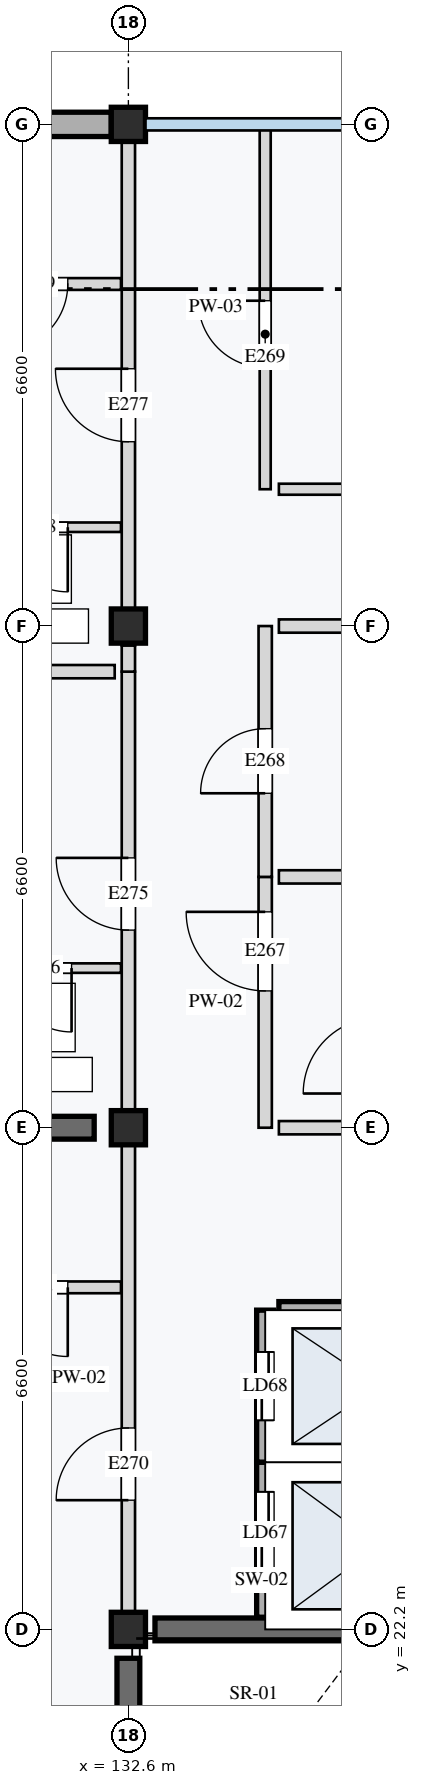
"""IFC4 building model, lengths in metres.
Left out: names, types, materials, properties, quantities, classifications, styles, units other than length and angle.
Written with IfcOpenShell. Run it as: python <this file> out.ifc"""

import sys

from ifc_helpers import new_model, si_unit, direction, frame, frame_2d, origin, origin_2d, place, context, subcontext, project, spatial, rectangle, extrude, element, fill, save


model = new_model("IFC4")
c1 = context("Model", 3, precision=1e-05, world=origin(), true_north=direction((0.0, 1.0)))
c2 = subcontext(c1, "Body", "Model", "MODEL_VIEW")
j1 = project(units=[si_unit("LENGTHUNIT", "METRE"), si_unit("PLANEANGLEUNIT", "RADIAN")], contexts=[c1])
p1 = place(None, origin())
s1 = spatial("IfcSite", under=j1, at=p1, CompositionType="ELEMENT")
p2 = place(p1, origin())
s2 = spatial("IfcBuilding", under=s1, at=p2, CompositionType="ELEMENT")
p3 = place(p2, frame((0.0, 0.0, 21.2)))
s3 = spatial("IfcBuildingStorey", under=s2, at=p3, CompositionType="ELEMENT", Elevation=21.2)
for number, where, z_axis, x_axis in (
    (1, (132.6, 22.2, 0.0), (0.0, 0.0, 1.0), (1.0, 0.0, 0.0)),
    (2, (132.6, 28.8, 0.0), (0.0, 0.0, 1.0), (1.0, 0.0, 0.0)),
    (3, (132.6, 35.4, 0.0), (0.0, 0.0, 1.0), (1.0, 0.0, 0.0)),
    (4, (132.6, 42.0, 0.0), (0.0, 0.0, 1.0), (1.0, 0.0, 0.0)),
):
    element("IfcColumn", number, at=place(p3, frame(where, z_axis=z_axis, x_axis=x_axis)), inside=s3, PredefinedType="COLUMN", context=c2, shape_type="SweptSolid", body=[
        extrude(rectangle(XDim=0.45, YDim=0.45, at=origin_2d()), origin(), (0.0, 0.0, 1.0), 3.2),
    ])
p4 = place(p3, frame((132.6, 15.98, 0.0), z_axis=(0.0, 0.0, 1.0), x_axis=(0.0, 1.0, 0.0)))
e5 = element("IfcWall", 5, at=p4, inside=s3, PredefinedType="SHEAR", context=c2, shape_type="SweptSolid", body=[
    extrude(rectangle(XDim=5.84, YDim=0.3, at=frame_2d((2.92, 0.0))), origin(), (0.0, 0.0, 1.0), 2.96),
])
p5 = place(p3, frame((132.95, 22.2, 0.0), z_axis=(0.0, 0.0, 1.0), x_axis=(1.0, 0.0, 0.0)))
e6 = element("IfcWall", 6, at=p5, inside=s3, PredefinedType="SHEAR", context=c2, shape_type="SweptSolid", body=[
    extrude(rectangle(XDim=2.8, YDim=0.3, at=frame_2d((1.4, 0.0))), origin(), (0.0, 0.0, 1.0), 2.96),
])
p6 = place(p3, frame((126.45, 28.8, 0.0), z_axis=(0.0, 0.0, 1.0), x_axis=(1.0, 0.0, 0.0)))
e7 = element("IfcWall", 7, at=p6, inside=s3, PredefinedType="SHEAR", context=c2, shape_type="SweptSolid", body=[
    extrude(rectangle(XDim=5.7, YDim=0.3, at=frame_2d((2.85, 0.0))), origin(), (0.0, 0.0, 1.0), 2.96),
])
p7 = place(p3, frame((126.225, 42.0, 0.0), z_axis=(0.0, 0.0, 1.0), x_axis=(1.0, 0.0, 0.0)))
e8 = element("IfcWall", 8, at=p7, inside=s3, PredefinedType="STANDARD", context=c2, shape_type="SweptSolid", body=[
    extrude(rectangle(XDim=6.15, YDim=0.32, at=frame_2d((3.075, 0.0))), origin(), (0.0, 0.0, 1.0), 2.65),
])
p8 = place(p3, frame((134.4, 22.36, 0.0), z_axis=(0.0, 0.0, 1.0), x_axis=(0.0, 1.0, 0.0)))
e9 = element("IfcWall", 9, at=p8, inside=s3, PredefinedType="STANDARD", context=c2, shape_type="SweptSolid", body=[
    extrude(rectangle(XDim=2.04, YDim=0.225, at=frame_2d((1.02, 0.0))), origin(), (0.0, 0.0, 1.0), 2.96),
])
p9 = place(p8, frame((0.55, 0.0, 0.0)))
e10 = element("IfcOpeningElement", 10, at=p9, cuts=e9, PredefinedType="OPENING", context=c2, shape_type="SweptSolid", body=[
    extrude(rectangle(XDim=1.1, YDim=2.1, at=frame_2d((0.55, 1.05))), frame((0.0, 0.123, 0.0), z_axis=(0.0, -1.0, 0.0), x_axis=(1.0, 0.0, 0.0)), (0.0, 0.0, 1.0), 0.245),
])
p10 = place(p3, frame((134.4, 24.4, 0.0), z_axis=(0.0, 0.0, 1.0), x_axis=(0.0, 1.0, 0.0)))
e11 = element("IfcWall", 11, at=p10, inside=s3, PredefinedType="STANDARD", context=c2, shape_type="SweptSolid", body=[
    extrude(rectangle(XDim=2.0, YDim=0.225, at=frame_2d((1.0, 0.0))), origin(), (0.0, 0.0, 1.0), 2.96),
])
p11 = place(p10, frame((0.55, 0.0, 0.0)))
e12 = element("IfcOpeningElement", 12, at=p11, cuts=e11, PredefinedType="OPENING", context=c2, shape_type="SweptSolid", body=[
    extrude(rectangle(XDim=0.9, YDim=2.1, at=frame_2d((0.45, 1.05))), frame((0.0, 0.123, 0.0), z_axis=(0.0, -1.0, 0.0), x_axis=(1.0, 0.0, 0.0)), (0.0, 0.0, 1.0), 0.245),
])
for number, where, z_axis, x_axis in (
    (13, (134.58, 24.4, 0.0), (0.0, 0.0, 1.0), (1.0, 0.0, 0.0)),
    (14, (134.58, 26.4, 0.0), (0.0, 0.0, 1.0), (1.0, 0.0, 0.0)),
):
    element("IfcWall", number, at=place(p3, frame(where, z_axis=z_axis, x_axis=x_axis)), inside=s3, PredefinedType="STANDARD", context=c2, shape_type="SweptSolid", body=[
        extrude(rectangle(XDim=2.64, YDim=0.225, at=frame_2d((1.32, 0.0))), origin(), (0.0, 0.0, 1.0), 2.96),
    ])
p12 = place(p3, frame((134.4, 28.8, 0.0), z_axis=(0.0, 0.0, 1.0), x_axis=(0.0, 1.0, 0.0)))
e15 = element("IfcWall", 15, at=p12, inside=s3, PredefinedType="PARTITIONING", context=c2, shape_type="SweptSolid", body=[
    extrude(rectangle(XDim=3.3, YDim=0.175, at=frame_2d((1.65, 0.0))), origin(), (0.0, 0.0, 1.0), 2.96),
])
p13 = place(p12, frame((1.8, 0.0, 0.0)))
e16 = element("IfcOpeningElement", 16, at=p13, cuts=e15, PredefinedType="OPENING", context=c2, shape_type="SweptSolid", body=[
    extrude(rectangle(XDim=1.04, YDim=2.12, at=frame_2d((0.52, 1.06))), frame((0.0, 0.097, 0.0), z_axis=(0.0, -1.0, 0.0), x_axis=(1.0, 0.0, 0.0)), (0.0, 0.0, 1.0), 0.195),
])
p14 = place(p3, frame((134.4, 32.1, 0.0), z_axis=(0.0, 0.0, 1.0), x_axis=(0.0, 1.0, 0.0)))
e17 = element("IfcWall", 17, at=p14, inside=s3, PredefinedType="PARTITIONING", context=c2, shape_type="SweptSolid", body=[
    extrude(rectangle(XDim=3.3, YDim=0.175, at=frame_2d((1.65, 0.0))), origin(), (0.0, 0.0, 1.0), 2.96),
])
p15 = place(p14, frame((1.1, 0.0, 0.0)))
e18 = element("IfcOpeningElement", 18, at=p15, cuts=e17, PredefinedType="OPENING", context=c2, shape_type="SweptSolid", body=[
    extrude(rectangle(XDim=0.85, YDim=2.0, at=frame_2d((0.425, 1.0))), frame((0.0, 0.097, 0.0), z_axis=(0.0, -1.0, 0.0), x_axis=(1.0, 0.0, 0.0)), (0.0, 0.0, 1.0), 0.195),
])
for number, where, z_axis, x_axis in (
    (19, (134.58, 28.8, 0.0), (0.0, 0.0, 1.0), (1.0, 0.0, 0.0)),
    (20, (134.58, 32.1, 0.0), (0.0, 0.0, 1.0), (1.0, 0.0, 0.0)),
    (21, (134.58, 35.4, 0.0), (0.0, 0.0, 1.0), (1.0, 0.0, 0.0)),
):
    element("IfcWall", number, at=place(p3, frame(where, z_axis=z_axis, x_axis=x_axis)), inside=s3, PredefinedType="PARTITIONING", context=c2, shape_type="SweptSolid", body=[
        extrude(rectangle(XDim=1.14, YDim=0.175, at=frame_2d((0.57, 0.0))), origin(), (0.0, 0.0, 1.0), 2.96),
    ])
p16 = place(p3, frame((134.4, 37.2, 0.0), z_axis=(0.0, 0.0, 1.0), x_axis=(0.0, 1.0, 0.0)))
e22 = element("IfcWall", 22, at=p16, inside=s3, PredefinedType="PARTITIONING", context=c2, shape_type="SweptSolid", body=[
    extrude(rectangle(XDim=4.8, YDim=0.145, at=frame_2d((2.4, 0.0))), origin(), (0.0, 0.0, 1.0), 2.96),
])
p17 = place(p16, frame((1.6, 0.0, 0.0)))
e23 = element("IfcOpeningElement", 23, at=p17, cuts=e22, PredefinedType="OPENING", context=c2, shape_type="SweptSolid", body=[
    extrude(rectangle(XDim=0.88, YDim=2.1, at=frame_2d((0.44, 1.05))), frame((0.0, 0.083, 0.0), z_axis=(0.0, -1.0, 0.0), x_axis=(1.0, 0.0, 0.0)), (0.0, 0.0, 1.0), 0.165),
])
p18 = place(p3, frame((134.58, 37.2, 0.0), z_axis=(0.0, 0.0, 1.0), x_axis=(1.0, 0.0, 0.0)))
e24 = element("IfcWall", 24, at=p18, inside=s3, PredefinedType="PARTITIONING", context=c2, shape_type="SweptSolid", body=[
    extrude(rectangle(XDim=2.64, YDim=0.145, at=frame_2d((1.32, 0.0))), origin(), (0.0, 0.0, 1.0), 2.96),
])
p19 = place(p3, frame((132.6, 22.2, 0.0), z_axis=(0.0, 0.0, 1.0), x_axis=(0.0, 1.0, 0.0)))
e25 = element("IfcWall", 25, at=p19, inside=s3, PredefinedType="PARTITIONING", context=c2, shape_type="SweptSolid", body=[
    extrude(rectangle(XDim=6.6, YDim=0.175, at=frame_2d((3.3, 0.0))), origin(), (0.0, 0.0, 1.0), 2.55),
])
p20 = place(p19, frame((1.7, 0.0, 0.0)))
e26 = element("IfcOpeningElement", 26, at=p20, cuts=e25, PredefinedType="OPENING", context=c2, shape_type="SweptSolid", body=[
    extrude(rectangle(XDim=0.95, YDim=2.1, at=frame_2d((0.475, 1.05))), frame((0.0, 0.097, 0.0), z_axis=(0.0, -1.0, 0.0), x_axis=(1.0, 0.0, 0.0)), (0.0, 0.0, 1.0), 0.195),
])
p21 = place(p3, frame((132.502, 26.7, 0.0), z_axis=(0.0, 0.0, 1.0), x_axis=(-1.0, 0.0, 0.0)))
e27 = element("IfcWall", 27, at=p21, inside=s3, PredefinedType="PARTITIONING", context=c2, shape_type="SweptSolid", body=[
    extrude(rectangle(XDim=2.302, YDim=0.155, at=frame_2d((1.151, 0.0))), origin(), (0.0, 0.0, 1.0), 2.96),
])
p22 = place(p21, frame((0.7, 0.0, 0.0)))
e28 = element("IfcOpeningElement", 28, at=p22, cuts=e27, PredefinedType="OPENING", context=c2, shape_type="SweptSolid", body=[
    extrude(rectangle(XDim=0.91, YDim=2.14, at=frame_2d((0.455, 1.07))), frame((0.0, 0.087, 0.0), z_axis=(0.0, -1.0, 0.0), x_axis=(1.0, 0.0, 0.0)), (0.0, 0.0, 1.0), 0.175),
])
p23 = place(p3, frame((132.6, 28.8, 0.0), z_axis=(0.0, 0.0, 1.0), x_axis=(0.0, 1.0, 0.0)))
e29 = element("IfcWall", 29, at=p23, inside=s3, PredefinedType="PARTITIONING", context=c2, shape_type="SweptSolid", body=[
    extrude(rectangle(XDim=6.0, YDim=0.175, at=frame_2d((3.0, 0.0))), origin(), (0.0, 0.0, 1.0), 2.55),
])
p24 = place(p23, frame((2.6, 0.0, 0.0)))
e30 = element("IfcOpeningElement", 30, at=p24, cuts=e29, PredefinedType="OPENING", context=c2, shape_type="SweptSolid", body=[
    extrude(rectangle(XDim=0.95, YDim=2.16, at=frame_2d((0.475, 1.08))), frame((0.0, 0.097, 0.0), z_axis=(0.0, -1.0, 0.0), x_axis=(1.0, 0.0, 0.0)), (0.0, 0.0, 1.0), 0.195),
])
p25 = place(p3, frame((132.502, 30.9, 0.0), z_axis=(0.0, 0.0, 1.0), x_axis=(-1.0, 0.0, 0.0)))
e31 = element("IfcWall", 31, at=p25, inside=s3, PredefinedType="PARTITIONING", context=c2, shape_type="SweptSolid", body=[
    extrude(rectangle(XDim=2.202, YDim=0.125, at=frame_2d((1.101, 0.0))), origin(), (0.0, 0.0, 1.0), 2.96),
])
p26 = place(p25, frame((0.65, 0.0, 0.0)))
e32 = element("IfcOpeningElement", 32, at=p26, cuts=e31, PredefinedType="OPENING", context=c2, shape_type="SweptSolid", body=[
    extrude(rectangle(XDim=0.84, YDim=2.06, at=frame_2d((0.42, 1.03))), frame((0.0, 0.073, 0.0), z_axis=(0.0, -1.0, 0.0), x_axis=(1.0, 0.0, 0.0)), (0.0, 0.0, 1.0), 0.145),
])
p27 = place(p3, frame((132.42, 34.8, 0.0), z_axis=(0.0, 0.0, 1.0), x_axis=(-1.0, 0.0, 0.0)))
e33 = element("IfcWall", 33, at=p27, inside=s3, PredefinedType="PARTITIONING", context=c2, shape_type="SweptSolid", body=[
    extrude(rectangle(XDim=6.19, YDim=0.175, at=frame_2d((3.095, 0.0))), origin(), (0.0, 0.0, 1.0), 2.96),
])
p28 = place(p3, frame((132.6, 34.8, 0.0), z_axis=(0.0, 0.0, 1.0), x_axis=(0.0, 1.0, 0.0)))
e34 = element("IfcWall", 34, at=p28, inside=s3, PredefinedType="PARTITIONING", context=c2, shape_type="SweptSolid", body=[
    extrude(rectangle(XDim=0.345, YDim=0.175, at=frame_2d((0.172, 0.0))), origin(), (0.0, 0.0, 1.0), 2.96),
])
p29 = place(p3, frame((132.6, 35.145, 0.0), z_axis=(0.0, 0.0, 1.0), x_axis=(0.0, 1.0, 0.0)))
e35 = element("IfcWall", 35, at=p29, inside=s3, PredefinedType="PARTITIONING", context=c2, shape_type="SweptSolid", body=[
    extrude(rectangle(XDim=6.855, YDim=0.175, at=frame_2d((3.427, 0.0))), origin(), (0.0, 0.0, 1.0), 2.55),
])
p30 = place(p29, frame((2.68, 0.0, 0.0)))
e36 = element("IfcOpeningElement", 36, at=p30, cuts=e35, PredefinedType="OPENING", context=c2, shape_type="SweptSolid", body=[
    extrude(rectangle(XDim=0.96, YDim=2.18, at=frame_2d((0.48, 1.09))), frame((0.0, 0.097, 0.0), z_axis=(0.0, -1.0, 0.0), x_axis=(1.0, 0.0, 0.0)), (0.0, 0.0, 1.0), 0.195),
])
p31 = place(p3, frame((132.502, 36.7, 0.0), z_axis=(0.0, 0.0, 1.0), x_axis=(-1.0, 0.0, 0.0)))
e37 = element("IfcWall", 37, at=p31, inside=s3, PredefinedType="PARTITIONING", context=c2, shape_type="SweptSolid", body=[
    extrude(rectangle(XDim=2.302, YDim=0.125, at=frame_2d((1.151, 0.0))), origin(), (0.0, 0.0, 1.0), 2.96),
])
p32 = place(p31, frame((0.7, 0.0, 0.0)))
e38 = element("IfcOpeningElement", 38, at=p32, cuts=e37, PredefinedType="OPENING", context=c2, shape_type="SweptSolid", body=[
    extrude(rectangle(XDim=0.85, YDim=2.04, at=frame_2d((0.425, 1.02))), frame((0.0, 0.073, 0.0), z_axis=(0.0, -1.0, 0.0), x_axis=(1.0, 0.0, 0.0)), (0.0, 0.0, 1.0), 0.145),
])
p33 = place(p3, frame((132.502, 39.9, 0.0), z_axis=(0.0, 0.0, 1.0), x_axis=(-1.0, 0.0, 0.0)))
e39 = element("IfcWall", 39, at=p33, inside=s3, PredefinedType="PARTITIONING", context=c2, shape_type="SweptSolid", body=[
    extrude(rectangle(XDim=2.302, YDim=0.155, at=frame_2d((1.151, 0.0))), origin(), (0.0, 0.0, 1.0), 2.96),
])
p34 = place(p33, frame((0.7, 0.0, 0.0)))
e40 = element("IfcOpeningElement", 40, at=p34, cuts=e39, PredefinedType="OPENING", context=c2, shape_type="SweptSolid", body=[
    extrude(rectangle(XDim=0.88, YDim=2.16, at=frame_2d((0.44, 1.08))), frame((0.0, 0.087, 0.0), z_axis=(0.0, -1.0, 0.0), x_axis=(1.0, 0.0, 0.0)), (0.0, 0.0, 1.0), 0.175),
])
p35 = place(p9, origin())
e41 = element("IfcDoor", 41, at=p35, inside=s3, OperationType="DOUBLE_DOOR_SLIDING", PredefinedType="DOOR", context=c2, shape_type="SweptSolid", body=[
    extrude(rectangle(XDim=1.1, YDim=2.1, at=frame_2d((0.55, 1.05))), frame((0.0, 0.025, 0.0), z_axis=(0.0, -1.0, 0.0), x_axis=(1.0, 0.0, 0.0)), (0.0, 0.0, 1.0), 0.05),
])
fill(e10, e41)
p36 = place(p11, origin())
e42 = element("IfcDoor", 42, at=p36, inside=s3, OperationType="DOUBLE_DOOR_SLIDING", PredefinedType="DOOR", context=c2, shape_type="SweptSolid", body=[
    extrude(rectangle(XDim=0.9, YDim=2.1, at=frame_2d((0.45, 1.05))), frame((0.0, 0.025, 0.0), z_axis=(0.0, -1.0, 0.0), x_axis=(1.0, 0.0, 0.0)), (0.0, 0.0, 1.0), 0.05),
])
fill(e12, e42)
p37 = place(p13, origin())
e43 = element("IfcDoor", 43, at=p37, inside=s3, OperationType="SINGLE_SWING_RIGHT", PredefinedType="DOOR", context=c2, shape_type="SweptSolid", body=[
    extrude(rectangle(XDim=1.04, YDim=2.12, at=frame_2d((0.52, 1.06))), frame((0.0, 0.025, 0.0), z_axis=(0.0, -1.0, 0.0), x_axis=(1.0, 0.0, 0.0)), (0.0, 0.0, 1.0), 0.05),
])
fill(e16, e43)
p38 = place(p15, origin())
e44 = element("IfcDoor", 44, at=p38, inside=s3, OperationType="SINGLE_SWING_LEFT", PredefinedType="DOOR", context=c2, shape_type="SweptSolid", body=[
    extrude(rectangle(XDim=0.85, YDim=2.0, at=frame_2d((0.425, 1.0))), frame((0.0, 0.025, 0.0), z_axis=(0.0, -1.0, 0.0), x_axis=(1.0, 0.0, 0.0)), (0.0, 0.0, 1.0), 0.05),
])
fill(e18, e44)
p39 = place(p17, origin())
e45 = element("IfcDoor", 45, at=p39, inside=s3, OperationType="SINGLE_SWING_RIGHT", PredefinedType="DOOR", context=c2, shape_type="SweptSolid", body=[
    extrude(rectangle(XDim=0.88, YDim=2.1, at=frame_2d((0.44, 1.05))), frame((0.0, 0.025, 0.0), z_axis=(0.0, -1.0, 0.0), x_axis=(1.0, 0.0, 0.0)), (0.0, 0.0, 1.0), 0.05),
])
fill(e23, e45)
p40 = place(p20, origin())
e46 = element("IfcDoor", 46, at=p40, inside=s3, OperationType="SINGLE_SWING_LEFT", PredefinedType="DOOR", context=c2, shape_type="SweptSolid", body=[
    extrude(rectangle(XDim=0.95, YDim=2.1, at=frame_2d((0.475, 1.05))), frame((0.0, 0.025, 0.0), z_axis=(0.0, -1.0, 0.0), x_axis=(1.0, 0.0, 0.0)), (0.0, 0.0, 1.0), 0.05),
])
fill(e26, e46)
p41 = place(p22, origin())
e47 = element("IfcDoor", 47, at=p41, inside=s3, OperationType="SINGLE_SWING_LEFT", PredefinedType="DOOR", context=c2, shape_type="SweptSolid", body=[
    extrude(rectangle(XDim=0.91, YDim=2.14, at=frame_2d((0.455, 1.07))), frame((0.0, 0.025, 0.0), z_axis=(0.0, -1.0, 0.0), x_axis=(1.0, 0.0, 0.0)), (0.0, 0.0, 1.0), 0.05),
])
fill(e28, e47)
p42 = place(p24, origin())
e48 = element("IfcDoor", 48, at=p42, inside=s3, OperationType="SINGLE_SWING_RIGHT", PredefinedType="DOOR", context=c2, shape_type="SweptSolid", body=[
    extrude(rectangle(XDim=0.95, YDim=2.16, at=frame_2d((0.475, 1.08))), frame((0.0, 0.025, 0.0), z_axis=(0.0, -1.0, 0.0), x_axis=(1.0, 0.0, 0.0)), (0.0, 0.0, 1.0), 0.05),
])
fill(e30, e48)
p43 = place(p26, origin())
e49 = element("IfcDoor", 49, at=p43, inside=s3, OperationType="SINGLE_SWING_LEFT", PredefinedType="DOOR", context=c2, shape_type="SweptSolid", body=[
    extrude(rectangle(XDim=0.84, YDim=2.06, at=frame_2d((0.42, 1.03))), frame((0.0, 0.025, 0.0), z_axis=(0.0, -1.0, 0.0), x_axis=(1.0, 0.0, 0.0)), (0.0, 0.0, 1.0), 0.05),
])
fill(e32, e49)
p44 = place(p30, origin())
e50 = element("IfcDoor", 50, at=p44, inside=s3, OperationType="SINGLE_SWING_RIGHT", PredefinedType="DOOR", context=c2, shape_type="SweptSolid", body=[
    extrude(rectangle(XDim=0.96, YDim=2.18, at=frame_2d((0.48, 1.09))), frame((0.0, 0.025, 0.0), z_axis=(0.0, -1.0, 0.0), x_axis=(1.0, 0.0, 0.0)), (0.0, 0.0, 1.0), 0.05),
])
fill(e36, e50)
p45 = place(p32, origin())
e51 = element("IfcDoor", 51, at=p45, inside=s3, OperationType="SINGLE_SWING_LEFT", PredefinedType="DOOR", context=c2, shape_type="SweptSolid", body=[
    extrude(rectangle(XDim=0.85, YDim=2.04, at=frame_2d((0.425, 1.02))), frame((0.0, 0.025, 0.0), z_axis=(0.0, -1.0, 0.0), x_axis=(1.0, 0.0, 0.0)), (0.0, 0.0, 1.0), 0.05),
])
fill(e38, e51)
p46 = place(p34, origin())
e52 = element("IfcDoor", 52, at=p46, inside=s3, OperationType="SINGLE_SWING_RIGHT", PredefinedType="DOOR", context=c2, shape_type="SweptSolid", body=[
    extrude(rectangle(XDim=0.88, YDim=2.16, at=frame_2d((0.44, 1.08))), frame((0.0, 0.025, 0.0), z_axis=(0.0, -1.0, 0.0), x_axis=(1.0, 0.0, 0.0)), (0.0, 0.0, 1.0), 0.05),
])
fill(e40, e52)
save(model, sys.argv[1])
